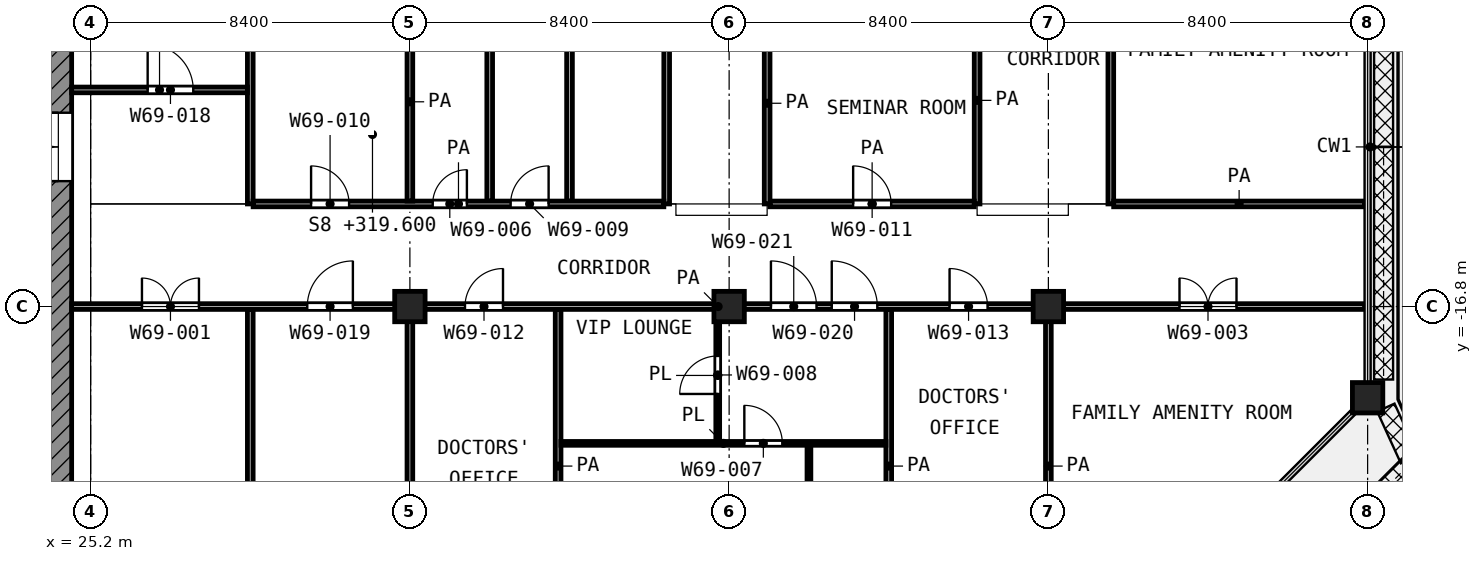
"""IFC4 building model, lengths in metres.
Left out: names, types, materials, properties, quantities, classifications, styles, units other than length and angle.
Written with IfcOpenShell. Run it as: python <this file> out.ifc"""

import sys

from ifc_helpers import new_model, si_unit, direction, frame, frame_2d, origin, origin_2d, place, context, subcontext, project, spatial, rectangle, extrude, element, fill, save


model = new_model("IFC4")
c1 = context("Model", 3, precision=1e-05, world=origin(), true_north=direction((0.0, 1.0)))
c2 = subcontext(c1, "Body", "Model", "MODEL_VIEW")
j1 = project(units=[si_unit("LENGTHUNIT", "METRE"), si_unit("PLANEANGLEUNIT", "RADIAN")], contexts=[c1])
p1 = place(None, origin())
s1 = spatial("IfcSite", under=j1, at=p1, CompositionType="ELEMENT")
p2 = place(p1, origin())
s2 = spatial("IfcBuilding", under=s1, at=p2, CompositionType="ELEMENT")
p3 = place(p2, frame((0.0, 0.0, 319.6)))
s3 = spatial("IfcBuildingStorey", under=s2, at=p3, CompositionType="ELEMENT", Elevation=319.6)
for number, where, z_axis, x_axis in (
    (1, (33.6, -16.8, 0.0), (0.0, 0.0, 1.0), (1.0, 0.0, 0.0)),
    (2, (42.0, -16.8, 0.0), (0.0, 0.0, 1.0), (1.0, 0.0, 0.0)),
    (3, (50.4, -16.8, 0.0), (0.0, 0.0, 1.0), (1.0, 0.0, 0.0)),
    (4, (58.8, -19.2, 0.0), (0.0, 0.0, 1.0), (1.0, 0.0, 0.0)),
):
    element("IfcColumn", number, at=place(p3, frame(where, z_axis=z_axis, x_axis=x_axis)), inside=s3, PredefinedType="COLUMN", context=c2, shape_type="SweptSolid", body=[
        extrude(rectangle(XDim=0.8, YDim=0.8, at=origin_2d()), origin(), (0.0, 0.0, 1.0), 4.2),
    ])
p4 = place(p3, frame((24.35, -24.0, 0.0), z_axis=(0.0, 0.0, 1.0), x_axis=(0.0, 1.0, 0.0)))
e5 = element("IfcWall", 5, at=p4, inside=s3, PredefinedType="SHEAR", context=c2, shape_type="SweptSolid", body=[
    extrude(rectangle(XDim=18.6, YDim=0.7, at=frame_2d((9.3, 0.0))), origin(), (0.0, 0.0, 1.0), 3.6),
])
p5 = place(p4, frame((10.5, 0.0, 0.0)))
e6 = element("IfcOpeningElement", 6, at=p5, cuts=e5, PredefinedType="OPENING", context=c2, shape_type="SweptSolid", body=[
    extrude(rectangle(XDim=1.8, YDim=2.1, at=frame_2d((0.9, 1.05))), frame((0.0, 0.36, 0.0), z_axis=(0.0, -1.0, 0.0), x_axis=(1.0, 0.0, 0.0)), (0.0, 0.0, 1.0), 0.72),
])
p6 = place(p3, frame((37.575, -20.4, 0.0), z_axis=(0.0, 0.0, 1.0), x_axis=(1.0, 0.0, 0.0)))
e7 = element("IfcWall", 7, at=p6, inside=s3, PredefinedType="PARTITIONING", context=c2, shape_type="SweptSolid", body=[
    extrude(rectangle(XDim=8.55, YDim=0.1, at=frame_2d((4.275, 0.0))), origin(), (0.0, 0.0, 1.0), 3.6),
])
p7 = place(p6, frame((4.825, 0.0, 0.0)))
e8 = element("IfcOpeningElement", 8, at=p7, cuts=e7, PredefinedType="OPENING", context=c2, shape_type="SweptSolid", body=[
    extrude(rectangle(XDim=1.0, YDim=2.1, at=frame_2d((0.5, 1.05))), frame((0.0, 0.06, 0.0), z_axis=(0.0, -1.0, 0.0), x_axis=(1.0, 0.0, 0.0)), (0.0, 0.0, 1.0), 0.12),
])
p8 = place(p3, frame((41.7, -20.35, 0.0), z_axis=(0.0, 0.0, 1.0), x_axis=(0.0, 1.0, 0.0)))
e9 = element("IfcWall", 9, at=p8, inside=s3, PredefinedType="PARTITIONING", context=c2, shape_type="SweptSolid", body=[
    extrude(rectangle(XDim=3.475, YDim=0.1, at=frame_2d((1.738, 0.0))), origin(), (0.0, 0.0, 1.0), 3.6),
])
p9 = place(p8, frame((1.25, 0.0, 0.0)))
e10 = element("IfcOpeningElement", 10, at=p9, cuts=e9, PredefinedType="OPENING", context=c2, shape_type="SweptSolid", body=[
    extrude(rectangle(XDim=1.0, YDim=2.1, at=frame_2d((0.5, 1.05))), frame((0.0, 0.06, 0.0), z_axis=(0.0, -1.0, 0.0), x_axis=(1.0, 0.0, 0.0)), (0.0, 0.0, 1.0), 0.12),
])
p10 = place(p3, frame((44.1, -25.12, 0.0), z_axis=(0.0, 0.0, 1.0), x_axis=(0.0, 1.0, 0.0)))
e11 = element("IfcWall", 11, at=p10, inside=s3, PredefinedType="PARTITIONING", context=c2, shape_type="SweptSolid", body=[
    extrude(rectangle(XDim=4.67, YDim=0.1, at=frame_2d((2.335, 0.0))), origin(), (0.0, 0.0, 1.0), 3.6),
])
p11 = place(p10, frame((1.87, 0.0, 0.0)))
e12 = element("IfcOpeningElement", 12, at=p11, cuts=e11, PredefinedType="OPENING", context=c2, shape_type="SweptSolid", body=[
    extrude(rectangle(XDim=0.9, YDim=2.1, at=frame_2d((0.45, 1.05))), frame((0.0, 0.06, 0.0), z_axis=(0.0, -1.0, 0.0), x_axis=(1.0, 0.0, 0.0)), (0.0, 0.0, 1.0), 0.12),
])
p12 = place(p3, frame((24.7, -16.8, 0.0), z_axis=(0.0, 0.0, 1.0), x_axis=(1.0, 0.0, 0.0)))
e13 = element("IfcWall", 13, at=p12, inside=s3, PredefinedType="PARTITIONING", context=c2, shape_type="SweptSolid", body=[
    extrude(rectangle(XDim=34.02, YDim=0.15, at=frame_2d((17.01, 0.0))), origin(), (0.0, 0.0, 1.0), 3.6),
])
p13 = place(p12, frame((1.85, 0.0, 0.0)))
e14 = element("IfcOpeningElement", 14, at=p13, cuts=e13, PredefinedType="OPENING", context=c2, shape_type="SweptSolid", body=[
    extrude(rectangle(XDim=1.5, YDim=2.1, at=frame_2d((0.75, 1.05))), frame((0.0, 0.085, 0.0), z_axis=(0.0, -1.0, 0.0), x_axis=(1.0, 0.0, 0.0)), (0.0, 0.0, 1.0), 0.17),
])
p14 = place(p12, frame((6.2, 0.0, 0.0)))
e15 = element("IfcOpeningElement", 15, at=p14, cuts=e13, PredefinedType="OPENING", context=c2, shape_type="SweptSolid", body=[
    extrude(rectangle(XDim=1.2, YDim=2.1, at=frame_2d((0.6, 1.05))), frame((0.0, 0.085, 0.0), z_axis=(0.0, -1.0, 0.0), x_axis=(1.0, 0.0, 0.0)), (0.0, 0.0, 1.0), 0.17),
])
p15 = place(p12, frame((10.35, 0.0, 0.0)))
e16 = element("IfcOpeningElement", 16, at=p15, cuts=e13, PredefinedType="OPENING", context=c2, shape_type="SweptSolid", body=[
    extrude(rectangle(XDim=1.0, YDim=2.1, at=frame_2d((0.5, 1.05))), frame((0.0, 0.085, 0.0), z_axis=(0.0, -1.0, 0.0), x_axis=(1.0, 0.0, 0.0)), (0.0, 0.0, 1.0), 0.17),
])
p16 = place(p12, frame((20.0, 0.0, 0.0)))
e17 = element("IfcOpeningElement", 17, at=p16, cuts=e13, PredefinedType="OPENING", context=c2, shape_type="SweptSolid", body=[
    extrude(rectangle(XDim=1.2, YDim=2.1, at=frame_2d((0.6, 1.05))), frame((0.0, 0.085, 0.0), z_axis=(0.0, -1.0, 0.0), x_axis=(1.0, 0.0, 0.0)), (0.0, 0.0, 1.0), 0.17),
])
p17 = place(p12, frame((18.4, 0.0, 0.0)))
e18 = element("IfcOpeningElement", 18, at=p17, cuts=e13, PredefinedType="OPENING", context=c2, shape_type="SweptSolid", body=[
    extrude(rectangle(XDim=1.2, YDim=2.1, at=frame_2d((0.6, 1.05))), frame((0.0, 0.085, 0.0), z_axis=(0.0, -1.0, 0.0), x_axis=(1.0, 0.0, 0.0)), (0.0, 0.0, 1.0), 0.17),
])
p18 = place(p12, frame((23.1, 0.0, 0.0)))
e19 = element("IfcOpeningElement", 19, at=p18, cuts=e13, PredefinedType="OPENING", context=c2, shape_type="SweptSolid", body=[
    extrude(rectangle(XDim=1.0, YDim=2.1, at=frame_2d((0.5, 1.05))), frame((0.0, 0.085, 0.0), z_axis=(0.0, -1.0, 0.0), x_axis=(1.0, 0.0, 0.0)), (0.0, 0.0, 1.0), 0.17),
])
p19 = place(p12, frame((29.15, 0.0, 0.0)))
e20 = element("IfcOpeningElement", 20, at=p19, cuts=e13, PredefinedType="OPENING", context=c2, shape_type="SweptSolid", body=[
    extrude(rectangle(XDim=1.5, YDim=2.1, at=frame_2d((0.75, 1.05))), frame((0.0, 0.085, 0.0), z_axis=(0.0, -1.0, 0.0), x_axis=(1.0, 0.0, 0.0)), (0.0, 0.0, 1.0), 0.17),
])
p20 = place(p3, frame((29.475, -14.1, 0.0), z_axis=(0.0, 0.0, 1.0), x_axis=(1.0, 0.0, 0.0)))
e21 = element("IfcWall", 21, at=p20, inside=s3, PredefinedType="PARTITIONING", context=c2, shape_type="SweptSolid", body=[
    extrude(rectangle(XDim=10.807, YDim=0.15, at=frame_2d((5.403, 0.0))), origin(), (0.0, 0.0, 1.0), 3.6),
])
p21 = place(p20, frame((1.525, 0.0, 0.0)))
e22 = element("IfcOpeningElement", 22, at=p21, cuts=e21, PredefinedType="OPENING", context=c2, shape_type="SweptSolid", body=[
    extrude(rectangle(XDim=1.0, YDim=2.1, at=frame_2d((0.5, 1.05))), frame((0.0, 0.085, 0.0), z_axis=(0.0, -1.0, 0.0), x_axis=(1.0, 0.0, 0.0)), (0.0, 0.0, 1.0), 0.17),
])
p22 = place(p20, frame((4.725, 0.0, 0.0)))
e23 = element("IfcOpeningElement", 23, at=p22, cuts=e21, PredefinedType="OPENING", context=c2, shape_type="SweptSolid", body=[
    extrude(rectangle(XDim=0.9, YDim=2.1, at=frame_2d((0.45, 1.05))), frame((0.0, 0.085, 0.0), z_axis=(0.0, -1.0, 0.0), x_axis=(1.0, 0.0, 0.0)), (0.0, 0.0, 1.0), 0.17),
])
p23 = place(p20, frame((6.775, 0.0, 0.0)))
e24 = element("IfcOpeningElement", 24, at=p23, cuts=e21, PredefinedType="OPENING", context=c2, shape_type="SweptSolid", body=[
    extrude(rectangle(XDim=1.0, YDim=2.1, at=frame_2d((0.5, 1.05))), frame((0.0, 0.085, 0.0), z_axis=(0.0, -1.0, 0.0), x_axis=(1.0, 0.0, 0.0)), (0.0, 0.0, 1.0), 0.17),
])
p24 = place(p3, frame((43.075, -14.1, 0.0), z_axis=(0.0, 0.0, 1.0), x_axis=(1.0, 0.0, 0.0)))
e25 = element("IfcWall", 25, at=p24, inside=s3, PredefinedType="PARTITIONING", context=c2, shape_type="SweptSolid", body=[
    extrude(rectangle(XDim=5.375, YDim=0.15, at=frame_2d((2.688, 0.0))), origin(), (0.0, 0.0, 1.0), 3.6),
])
p25 = place(p24, frame((2.188, 0.0, 0.0)))
e26 = element("IfcOpeningElement", 26, at=p25, cuts=e25, PredefinedType="OPENING", context=c2, shape_type="SweptSolid", body=[
    extrude(rectangle(XDim=1.0, YDim=2.1, at=frame_2d((0.5, 1.05))), frame((0.0, 0.085, 0.0), z_axis=(0.0, -1.0, 0.0), x_axis=(1.0, 0.0, 0.0)), (0.0, 0.0, 1.0), 0.17),
])
p26 = place(p3, frame((52.118, -14.1, 0.0), z_axis=(0.0, 0.0, 1.0), x_axis=(1.0, 0.0, 0.0)))
e27 = element("IfcWall", 27, at=p26, inside=s3, PredefinedType="PARTITIONING", context=c2, shape_type="SweptSolid", body=[
    extrude(rectangle(XDim=6.602, YDim=0.15, at=frame_2d((3.301, 0.0))), origin(), (0.0, 0.0, 1.0), 3.6),
])
p27 = place(p3, frame((24.7, -11.1, 0.0), z_axis=(0.0, 0.0, 1.0), x_axis=(1.0, 0.0, 0.0)))
e28 = element("IfcWall", 28, at=p27, inside=s3, PredefinedType="PARTITIONING", context=c2, shape_type="SweptSolid", body=[
    extrude(rectangle(XDim=4.625, YDim=0.15, at=frame_2d((2.312, 0.0))), origin(), (0.0, 0.0, 1.0), 3.6),
])
p28 = place(p27, frame((2.0, 0.0, 0.0)))
e29 = element("IfcOpeningElement", 29, at=p28, cuts=e28, PredefinedType="OPENING", context=c2, shape_type="SweptSolid", body=[
    extrude(rectangle(XDim=1.2, YDim=2.1, at=frame_2d((0.6, 1.05))), frame((0.0, 0.085, 0.0), z_axis=(0.0, -1.0, 0.0), x_axis=(1.0, 0.0, 0.0)), (0.0, 0.0, 1.0), 0.17),
])
p29 = place(p3, frame((29.4, -31.198, 0.0), z_axis=(0.0, 0.0, 1.0), x_axis=(0.0, 1.0, 0.0)))
e30 = element("IfcWall", 30, at=p29, inside=s3, PredefinedType="PARTITIONING", context=c2, shape_type="SweptSolid", body=[
    extrude(rectangle(XDim=14.323, YDim=0.15, at=frame_2d((7.162, 0.0))), origin(), (0.0, 0.0, 1.0), 3.6),
])
p30 = place(p3, frame((29.4, -14.1, 0.0), z_axis=(0.0, 0.0, 1.0), x_axis=(0.0, 1.0, 0.0)))
e31 = element("IfcWall", 31, at=p30, inside=s3, PredefinedType="PARTITIONING", context=c2, shape_type="SweptSolid", body=[
    extrude(rectangle(XDim=14.02, YDim=0.15, at=frame_2d((7.01, 0.0))), origin(), (0.0, 0.0, 1.0), 3.6),
])
p31 = place(p3, frame((33.6, -28.687, 0.0), z_axis=(0.0, 0.0, 1.0), x_axis=(0.0, 1.0, 0.0)))
e32 = element("IfcWall", 32, at=p31, inside=s3, PredefinedType="PARTITIONING", context=c2, shape_type="SweptSolid", body=[
    extrude(rectangle(XDim=11.812, YDim=0.15, at=frame_2d((5.906, 0.0))), origin(), (0.0, 0.0, 1.0), 3.6),
])
p32 = place(p3, frame((33.6, -14.025, 0.0), z_axis=(0.0, 0.0, 1.0), x_axis=(0.0, 1.0, 0.0)))
e33 = element("IfcWall", 33, at=p32, inside=s3, PredefinedType="PARTITIONING", context=c2, shape_type="SweptSolid", body=[
    extrude(rectangle(XDim=5.225, YDim=0.15, at=frame_2d((2.612, 0.0))), origin(), (0.0, 0.0, 1.0), 3.6),
])
p33 = place(p3, frame((35.7, -14.025, 0.0), z_axis=(0.0, 0.0, 1.0), x_axis=(0.0, 1.0, 0.0)))
e34 = element("IfcWall", 34, at=p33, inside=s3, PredefinedType="PARTITIONING", context=c2, shape_type="SweptSolid", body=[
    extrude(rectangle(XDim=13.945, YDim=0.15, at=frame_2d((6.972, 0.0))), origin(), (0.0, 0.0, 1.0), 3.6),
])
p34 = place(p3, frame((37.5, -25.12, 0.0), z_axis=(0.0, 0.0, 1.0), x_axis=(0.0, 1.0, 0.0)))
e35 = element("IfcWall", 35, at=p34, inside=s3, PredefinedType="PARTITIONING", context=c2, shape_type="SweptSolid", body=[
    extrude(rectangle(XDim=8.245, YDim=0.15, at=frame_2d((4.123, 0.0))), origin(), (0.0, 0.0, 1.0), 3.6),
])
p35 = place(p3, frame((37.8, -14.025, 0.0), z_axis=(0.0, 0.0, 1.0), x_axis=(0.0, 1.0, 0.0)))
e36 = element("IfcWall", 36, at=p35, inside=s3, PredefinedType="PARTITIONING", context=c2, shape_type="SweptSolid", body=[
    extrude(rectangle(XDim=13.945, YDim=0.15, at=frame_2d((6.972, 0.0))), origin(), (0.0, 0.0, 1.0), 3.6),
])
p36 = place(p3, frame((40.357, -14.1, 0.0), z_axis=(0.0, 0.0, 1.0), x_axis=(0.0, 1.0, 0.0)))
e37 = element("IfcWall", 37, at=p36, inside=s3, PredefinedType="PARTITIONING", context=c2, shape_type="SweptSolid", body=[
    extrude(rectangle(XDim=14.02, YDim=0.15, at=frame_2d((7.01, 0.0))), origin(), (0.0, 0.0, 1.0), 3.6),
])
p37 = place(p36, frame((6.375, 0.0, 0.0)))
e38 = element("IfcOpeningElement", 38, at=p37, cuts=e37, PredefinedType="OPENING", context=c2, shape_type="SweptSolid", body=[
    extrude(rectangle(XDim=1.0, YDim=2.1, at=frame_2d((0.5, 1.05))), frame((0.0, 0.085, 0.0), z_axis=(0.0, -1.0, 0.0), x_axis=(1.0, 0.0, 0.0)), (0.0, 0.0, 1.0), 0.17),
])
p38 = place(p3, frame((43.0, -14.1, 0.0), z_axis=(0.0, 0.0, 1.0), x_axis=(0.0, 1.0, 0.0)))
e39 = element("IfcWall", 39, at=p38, inside=s3, PredefinedType="PARTITIONING", context=c2, shape_type="SweptSolid", body=[
    extrude(rectangle(XDim=5.298, YDim=0.15, at=frame_2d((2.649, 0.0))), origin(), (0.0, 0.0, 1.0), 3.6),
])
p39 = place(p3, frame((46.2, -25.12, 0.0), z_axis=(0.0, 0.0, 1.0), x_axis=(0.0, 1.0, 0.0)))
e40 = element("IfcWall", 40, at=p39, inside=s3, PredefinedType="PARTITIONING", context=c2, shape_type="SweptSolid", body=[
    extrude(rectangle(XDim=8.245, YDim=0.15, at=frame_2d((4.123, 0.0))), origin(), (0.0, 0.0, 1.0), 3.6),
])
p40 = place(p3, frame((48.525, -14.1, 0.0), z_axis=(0.0, 0.0, 1.0), x_axis=(0.0, 1.0, 0.0)))
e41 = element("IfcWall", 41, at=p40, inside=s3, PredefinedType="PARTITIONING", context=c2, shape_type="SweptSolid", body=[
    extrude(rectangle(XDim=5.45, YDim=0.15, at=frame_2d((2.725, 0.0))), origin(), (0.0, 0.0, 1.0), 3.6),
])
p41 = place(p3, frame((50.4, -25.12, 0.0), z_axis=(0.0, 0.0, 1.0), x_axis=(0.0, 1.0, 0.0)))
e42 = element("IfcWall", 42, at=p41, inside=s3, PredefinedType="PARTITIONING", context=c2, shape_type="SweptSolid", body=[
    extrude(rectangle(XDim=8.245, YDim=0.15, at=frame_2d((4.123, 0.0))), origin(), (0.0, 0.0, 1.0), 3.6),
])
p42 = place(p3, frame((52.043, -14.1, 0.0), z_axis=(0.0, 0.0, 1.0), x_axis=(0.0, 1.0, 0.0)))
e43 = element("IfcWall", 43, at=p42, inside=s3, PredefinedType="PARTITIONING", context=c2, shape_type="SweptSolid", body=[
    extrude(rectangle(XDim=12.248, YDim=0.15, at=frame_2d((6.124, 0.0))), origin(), (0.0, 0.0, 1.0), 3.6),
])
p43 = place(p42, frame((6.074, 0.0, 0.0)))
e44 = element("IfcOpeningElement", 44, at=p43, cuts=e43, PredefinedType="OPENING", context=c2, shape_type="SweptSolid", body=[
    extrude(rectangle(XDim=1.5, YDim=2.1, at=frame_2d((0.75, 1.05))), frame((0.0, 0.085, 0.0), z_axis=(0.0, -1.0, 0.0), x_axis=(1.0, 0.0, 0.0)), (0.0, 0.0, 1.0), 0.17),
])
p44 = place(p5, origin())
e45 = element("IfcDoor", 45, at=p44, inside=s3, OperationType="DOUBLE_DOOR_SINGLE_SWING", PredefinedType="DOOR", context=c2, shape_type="SweptSolid", body=[
    extrude(rectangle(XDim=1.8, YDim=2.1, at=frame_2d((0.9, 1.05))), frame((0.0, 0.025, 0.0), z_axis=(0.0, -1.0, 0.0), x_axis=(1.0, 0.0, 0.0)), (0.0, 0.0, 1.0), 0.05),
])
fill(e6, e45)
p45 = place(p13, origin())
e46 = element("IfcDoor", 46, at=p45, inside=s3, OperationType="DOUBLE_DOOR_SINGLE_SWING", PredefinedType="DOOR", context=c2, shape_type="SweptSolid", body=[
    extrude(rectangle(XDim=1.5, YDim=2.1, at=frame_2d((0.75, 1.05))), frame((0.0, 0.025, 0.0), z_axis=(0.0, -1.0, 0.0), x_axis=(1.0, 0.0, 0.0)), (0.0, 0.0, 1.0), 0.05),
])
fill(e14, e46)
p46 = place(p28, origin())
e47 = element("IfcDoor", 47, at=p46, inside=s3, OperationType="SINGLE_SWING_LEFT", PredefinedType="DOOR", context=c2, shape_type="SweptSolid", body=[
    extrude(rectangle(XDim=1.2, YDim=2.1, at=frame_2d((0.6, 1.05))), frame((0.0, 0.025, 0.0), z_axis=(0.0, -1.0, 0.0), x_axis=(1.0, 0.0, 0.0)), (0.0, 0.0, 1.0), 0.05),
])
fill(e29, e47)
p47 = place(p21, origin())
e48 = element("IfcDoor", 48, at=p47, inside=s3, OperationType="SINGLE_SWING_LEFT", PredefinedType="DOOR", context=c2, shape_type="SweptSolid", body=[
    extrude(rectangle(XDim=1.0, YDim=2.1, at=frame_2d((0.5, 1.05))), frame((0.0, 0.025, 0.0), z_axis=(0.0, -1.0, 0.0), x_axis=(1.0, 0.0, 0.0)), (0.0, 0.0, 1.0), 0.05),
])
fill(e22, e48)
p48 = place(p25, origin())
e49 = element("IfcDoor", 49, at=p48, inside=s3, OperationType="SINGLE_SWING_LEFT", PredefinedType="DOOR", context=c2, shape_type="SweptSolid", body=[
    extrude(rectangle(XDim=1.0, YDim=2.1, at=frame_2d((0.5, 1.05))), frame((0.0, 0.025, 0.0), z_axis=(0.0, -1.0, 0.0), x_axis=(1.0, 0.0, 0.0)), (0.0, 0.0, 1.0), 0.05),
])
fill(e26, e49)
p49 = place(p14, origin())
e50 = element("IfcDoor", 50, at=p49, inside=s3, OperationType="SINGLE_SWING_RIGHT", PredefinedType="DOOR", context=c2, shape_type="SweptSolid", body=[
    extrude(rectangle(XDim=1.2, YDim=2.1, at=frame_2d((0.6, 1.05))), frame((0.0, 0.025, 0.0), z_axis=(0.0, -1.0, 0.0), x_axis=(1.0, 0.0, 0.0)), (0.0, 0.0, 1.0), 0.05),
])
fill(e15, e50)
p50 = place(p15, origin())
e51 = element("IfcDoor", 51, at=p50, inside=s3, OperationType="SINGLE_SWING_RIGHT", PredefinedType="DOOR", context=c2, shape_type="SweptSolid", body=[
    extrude(rectangle(XDim=1.0, YDim=2.1, at=frame_2d((0.5, 1.05))), frame((0.0, 0.025, 0.0), z_axis=(0.0, -1.0, 0.0), x_axis=(1.0, 0.0, 0.0)), (0.0, 0.0, 1.0), 0.05),
])
fill(e16, e51)
p51 = place(p16, origin())
e52 = element("IfcDoor", 52, at=p51, inside=s3, OperationType="SINGLE_SWING_LEFT", PredefinedType="DOOR", context=c2, shape_type="SweptSolid", body=[
    extrude(rectangle(XDim=1.2, YDim=2.1, at=frame_2d((0.6, 1.05))), frame((0.0, 0.025, 0.0), z_axis=(0.0, -1.0, 0.0), x_axis=(1.0, 0.0, 0.0)), (0.0, 0.0, 1.0), 0.05),
])
fill(e17, e52)
p52 = place(p17, origin())
e53 = element("IfcDoor", 53, at=p52, inside=s3, OperationType="SINGLE_SWING_LEFT", PredefinedType="DOOR", context=c2, shape_type="SweptSolid", body=[
    extrude(rectangle(XDim=1.2, YDim=2.1, at=frame_2d((0.6, 1.05))), frame((0.0, 0.025, 0.0), z_axis=(0.0, -1.0, 0.0), x_axis=(1.0, 0.0, 0.0)), (0.0, 0.0, 1.0), 0.05),
])
fill(e18, e53)
p53 = place(p7, origin())
e54 = element("IfcDoor", 54, at=p53, inside=s3, OperationType="SINGLE_SWING_LEFT", PredefinedType="DOOR", context=c2, shape_type="SweptSolid", body=[
    extrude(rectangle(XDim=1.0, YDim=2.1, at=frame_2d((0.5, 1.05))), frame((0.0, 0.025, 0.0), z_axis=(0.0, -1.0, 0.0), x_axis=(1.0, 0.0, 0.0)), (0.0, 0.0, 1.0), 0.05),
])
fill(e8, e54)
p54 = place(p9, origin())
e55 = element("IfcDoor", 55, at=p54, inside=s3, OperationType="SINGLE_SWING_LEFT", PredefinedType="DOOR", context=c2, shape_type="SweptSolid", body=[
    extrude(rectangle(XDim=1.0, YDim=2.1, at=frame_2d((0.5, 1.05))), frame((0.0, 0.025, 0.0), z_axis=(0.0, -1.0, 0.0), x_axis=(1.0, 0.0, 0.0)), (0.0, 0.0, 1.0), 0.05),
])
fill(e10, e55)
p55 = place(p18, origin())
e56 = element("IfcDoor", 56, at=p55, inside=s3, OperationType="SINGLE_SWING_LEFT", PredefinedType="DOOR", context=c2, shape_type="SweptSolid", body=[
    extrude(rectangle(XDim=1.0, YDim=2.1, at=frame_2d((0.5, 1.05))), frame((0.0, 0.025, 0.0), z_axis=(0.0, -1.0, 0.0), x_axis=(1.0, 0.0, 0.0)), (0.0, 0.0, 1.0), 0.05),
])
fill(e19, e56)
p56 = place(p19, origin())
e57 = element("IfcDoor", 57, at=p56, inside=s3, OperationType="DOUBLE_DOOR_SINGLE_SWING", PredefinedType="DOOR", context=c2, shape_type="SweptSolid", body=[
    extrude(rectangle(XDim=1.5, YDim=2.1, at=frame_2d((0.75, 1.05))), frame((0.0, 0.025, 0.0), z_axis=(0.0, -1.0, 0.0), x_axis=(1.0, 0.0, 0.0)), (0.0, 0.0, 1.0), 0.05),
])
fill(e20, e57)
p57 = place(p22, origin())
e58 = element("IfcDoor", 58, at=p57, inside=s3, OperationType="SINGLE_SWING_RIGHT", PredefinedType="DOOR", context=c2, shape_type="SweptSolid", body=[
    extrude(rectangle(XDim=0.9, YDim=2.1, at=frame_2d((0.45, 1.05))), frame((0.0, 0.025, 0.0), z_axis=(0.0, -1.0, 0.0), x_axis=(1.0, 0.0, 0.0)), (0.0, 0.0, 1.0), 0.05),
])
fill(e23, e58)
p58 = place(p23, origin())
e59 = element("IfcDoor", 59, at=p58, inside=s3, OperationType="SINGLE_SWING_RIGHT", PredefinedType="DOOR", context=c2, shape_type="SweptSolid", body=[
    extrude(rectangle(XDim=1.0, YDim=2.1, at=frame_2d((0.5, 1.05))), frame((0.0, 0.025, 0.0), z_axis=(0.0, -1.0, 0.0), x_axis=(1.0, 0.0, 0.0)), (0.0, 0.0, 1.0), 0.05),
])
fill(e24, e59)
save(model, sys.argv[1])
